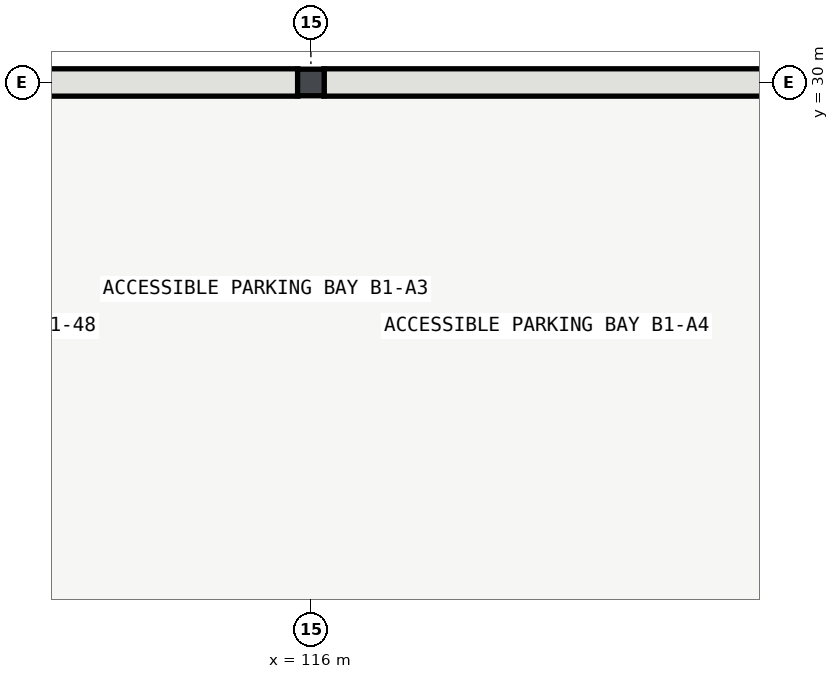
"""IFC4 building model, lengths in metres.
Left out: names, types, materials, properties, quantities, classifications, styles, units other than length and angle.
Written with IfcOpenShell. Run it as: python <this file> out.ifc"""

import sys

from ifc_helpers import new_model, si_unit, direction, frame, frame_2d, origin, origin_2d, place, context, subcontext, project, spatial, rectangle, i_section, extrude, element, save


model = new_model("IFC4")
c1 = context("Model", 3, precision=1e-05, world=origin(), true_north=direction((0.0, 1.0)))
c2 = subcontext(c1, "Body", "Model", "MODEL_VIEW")
j1 = project(units=[si_unit("LENGTHUNIT", "METRE"), si_unit("PLANEANGLEUNIT", "RADIAN")], contexts=[c1])
p1 = place(None, origin())
s1 = spatial("IfcSite", under=j1, at=p1, CompositionType="ELEMENT")
p2 = place(p1, origin())
s2 = spatial("IfcBuilding", under=s1, at=p2, CompositionType="ELEMENT")
p3 = place(p2, frame((0.0, 0.0, -4.8)))
s3 = spatial("IfcBuildingStorey", under=s2, at=p3, CompositionType="ELEMENT", Elevation=-4.8)
p4 = place(p3, frame((116.0, 30.0, 0.0), z_axis=(0.0, 0.0, 1.0), x_axis=(1.0, 0.0, 0.0)))
e1 = element("IfcColumn", 1, at=p4, inside=s3, PredefinedType="COLUMN", context=c2, shape_type="SweptSolid", body=[
    extrude(i_section(OverallWidth=0.35, OverallDepth=0.35, WebThickness=0.012, FlangeThickness=0.019, FilletRadius=0.02, at=origin_2d()), origin(), (0.0, 0.0, 1.0), 4.8),
])
for number, where, z_axis, x_axis in (
    (2, (115.829, 30.0, 0.0), (0.0, 0.0, 1.0), (-1.0, 0.0, 0.0)),
    (3, (123.829, 30.0, 0.0), (0.0, 0.0, 1.0), (-1.0, 0.0, 0.0)),
):
    element("IfcWall", number, at=place(p3, frame(where, z_axis=z_axis, x_axis=x_axis)), inside=s3, PredefinedType="USERDEFINED", context=c2, shape_type="SweptSolid", body=[
        extrude(rectangle(XDim=7.658, YDim=0.36, at=frame_2d((3.829, 0.0))), origin(), (0.0, 0.0, 1.0), 4.043),
    ])
save(model, sys.argv[1])
